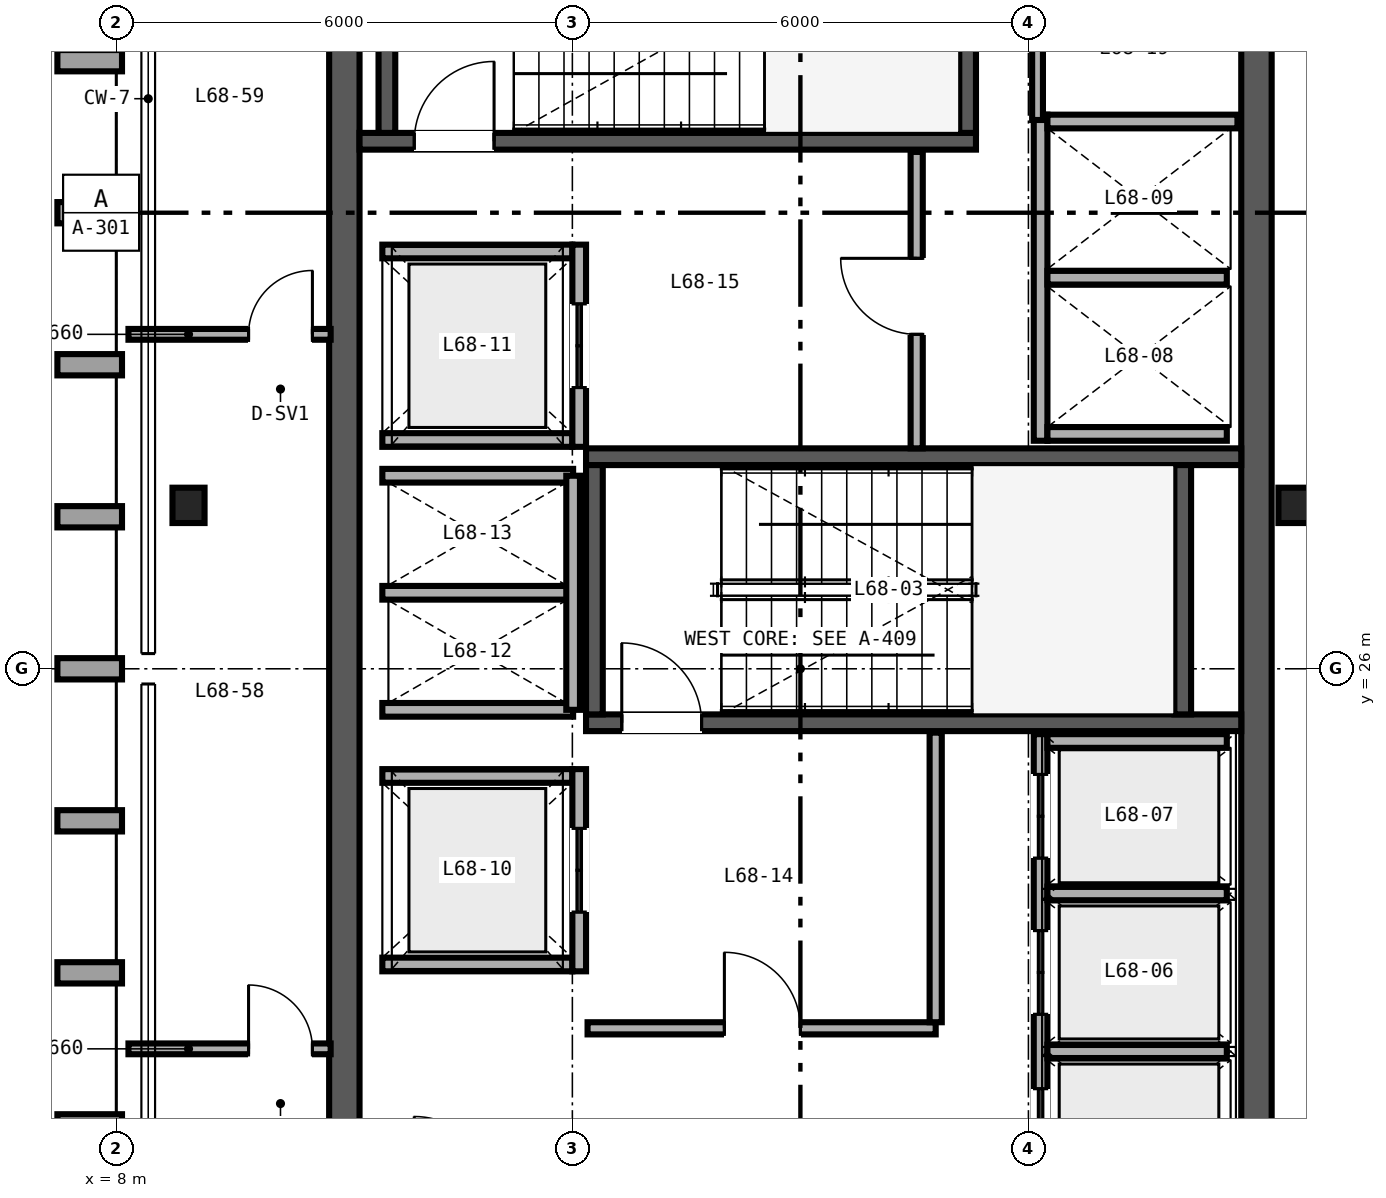
"""IFC4 building model, lengths in metres.
Left out: names, types, materials, properties, quantities, classifications, styles, units other than length and angle.
Written with IfcOpenShell. Run it as: python <this file> out.ifc"""

import sys

from ifc_helpers import new_model, si_unit, direction, frame, frame_2d, origin, origin_2d, place, context, subcontext, project, spatial, rectangle, i_section, extrude, source, transform, mapped, element, fill, save


model = new_model("IFC4")
c1 = context("Model", 3, precision=1e-05, world=origin(), true_north=direction((0.0, 1.0)))
c2 = subcontext(c1, "Body", "Model", "MODEL_VIEW")
j1 = project(units=[si_unit("LENGTHUNIT", "METRE"), si_unit("PLANEANGLEUNIT", "RADIAN")], contexts=[c1])
p1 = place(None, origin())
s1 = spatial("IfcSite", under=j1, at=p1, CompositionType="ELEMENT")
p2 = place(p1, origin())
s2 = spatial("IfcBuilding", under=s1, at=p2, CompositionType="ELEMENT")
p3 = place(p2, frame((0.0, 0.0, 268.8)))
s3 = spatial("IfcBuildingStorey", under=s2, at=p3, CompositionType="ELEMENT", Elevation=268.8)
for number, where, z_axis, x_axis in (
    (1, (11.0, 15.2, 0.0), (0.0, 0.0, 1.0), (0.0, 1.0, 0.0)),
    (2, (23.0, 15.2, 0.0), (0.0, 0.0, 1.0), (0.0, 1.0, 0.0)),
):
    element("IfcWall", number, at=place(p3, frame(where, z_axis=z_axis, x_axis=x_axis)), inside=s3, PredefinedType="SHEAR", context=c2, shape_type="SweptSolid", body=[
        extrude(rectangle(XDim=21.6, YDim=0.4, at=frame_2d((10.8, 0.0))), origin(), (0.0, 0.0, 1.0), 3.28),
    ])
p4 = place(p3, frame((11.2, 32.94, 0.0), z_axis=(0.0, 0.0, 1.0), x_axis=(1.0, 0.0, 0.0)))
e3 = element("IfcWall", 3, at=p4, inside=s3, PredefinedType="SHEAR", context=c2, shape_type="SweptSolid", body=[
    extrude(rectangle(XDim=8.11, YDim=0.22, at=frame_2d((4.055, 0.0))), origin(), (0.0, 0.0, 1.0), 3.4),
])
p5 = place(p4, frame((0.72, 0.0, 0.0)))
e4 = element("IfcOpeningElement", 4, at=p5, cuts=e3, PredefinedType="OPENING", context=c2, shape_type="SweptSolid", body=[
    extrude(rectangle(XDim=1.05, YDim=2.15, at=frame_2d((0.525, 1.075))), frame((0.0, 0.12, 0.0), z_axis=(0.0, -1.0, 0.0), x_axis=(1.0, 0.0, 0.0)), (0.0, 0.0, 1.0), 0.24),
])
for number, where, z_axis, x_axis in (
    (5, (11.56, 33.05, 0.0), (0.0, 0.0, 1.0), (0.0, 1.0, 0.0)),
    (6, (19.2, 33.05, 0.0), (0.0, 0.0, 1.0), (0.0, 1.0, 0.0)),
):
    element("IfcWall", number, at=place(p3, frame(where, z_axis=z_axis, x_axis=x_axis)), inside=s3, PredefinedType="SHEAR", context=c2, shape_type="SweptSolid", body=[
        extrude(rectangle(XDim=3.28, YDim=0.22, at=frame_2d((1.64, 0.0))), origin(), (0.0, 0.0, 1.0), 3.4),
    ])
p6 = place(p3, frame((14.18, 25.29, 0.0), z_axis=(0.0, 0.0, 1.0), x_axis=(1.0, 0.0, 0.0)))
e7 = element("IfcWall", 7, at=p6, inside=s3, PredefinedType="SHEAR", context=c2, shape_type="SweptSolid", body=[
    extrude(rectangle(XDim=8.62, YDim=0.22, at=frame_2d((4.31, 0.0))), origin(), (0.0, 0.0, 1.0), 3.4),
])
p7 = place(p6, frame((0.47, 0.0, 0.0)))
e8 = element("IfcOpeningElement", 8, at=p7, cuts=e7, PredefinedType="OPENING", context=c2, shape_type="SweptSolid", body=[
    extrude(rectangle(XDim=1.05, YDim=2.15, at=frame_2d((0.525, 1.075))), frame((0.0, 0.12, 0.0), z_axis=(0.0, -1.0, 0.0), x_axis=(1.0, 0.0, 0.0)), (0.0, 0.0, 1.0), 0.24),
])
p8 = place(p3, frame((14.18, 28.79, 0.0), z_axis=(0.0, 0.0, 1.0), x_axis=(1.0, 0.0, 0.0)))
e9 = element("IfcWall", 9, at=p8, inside=s3, PredefinedType="SHEAR", context=c2, shape_type="SweptSolid", body=[
    extrude(rectangle(XDim=8.62, YDim=0.22, at=frame_2d((4.31, 0.0))), origin(), (0.0, 0.0, 1.0), 3.4),
])
for number, where, z_axis, x_axis in (
    (10, (14.29, 25.4, 0.0), (0.0, 0.0, 1.0), (0.0, 1.0, 0.0)),
    (11, (22.03, 25.4, 0.0), (0.0, 0.0, 1.0), (0.0, 1.0, 0.0)),
):
    element("IfcWall", number, at=place(p3, frame(where, z_axis=z_axis, x_axis=x_axis)), inside=s3, PredefinedType="SHEAR", context=c2, shape_type="SweptSolid", body=[
        extrude(rectangle(XDim=3.28, YDim=0.22, at=frame_2d((1.64, 0.0))), origin(), (0.0, 0.0, 1.0), 3.4),
    ])
m1 = source(origin(), c2, "Body", "SweptSolid", [
    extrude(i_section(OverallWidth=0.422, OverallDepth=0.465, WebThickness=0.045, FlangeThickness=0.073, FilletRadius=0.025, at=origin_2d()), origin(), (0.0, 0.0, 1.0), 3.28),
])
for number, where, z_axis, x_axis in (
    (12, (8.95, 28.15, 0.0), (0.0, 0.0, 1.0), (1.0, 0.0, 0.0)),
    (13, (23.5, 28.15, 0.0), (0.0, 0.0, 1.0), (1.0, 0.0, 0.0)),
):
    element("IfcColumn", number, at=place(p3, frame(where, z_axis=z_axis, x_axis=x_axis)), inside=s3, PredefinedType="COLUMN", context=c2, shape_type="MappedRepresentation", body=[
        mapped(m1, transform((0.0, 0.0, 0.0), scale=1.0)),
    ])
p9 = place(p3, frame((20.16, 18.82, 0.0), z_axis=(0.0, 0.0, 1.0), x_axis=(0.0, 1.0, 0.0)))
e14 = element("IfcWall", 14, at=p9, inside=s3, PredefinedType="SOLIDWALL", context=c2, shape_type="SweptSolid", body=[
    extrude(rectangle(XDim=6.32, YDim=0.18, at=frame_2d((3.16, 0.0))), origin(), (0.0, 0.0, 1.0), 2.38),
])
p10 = place(p9, frame((0.555, 0.0, 0.0)))
e15 = element("IfcOpeningElement", 15, at=p10, cuts=e14, PredefinedType="OPENING", context=c2, shape_type="SweptSolid", body=[
    extrude(rectangle(XDim=1.1, YDim=2.2, at=frame_2d((0.55, 1.1))), frame((0.0, 0.1, 0.0), z_axis=(0.0, -1.0, 0.0), x_axis=(1.0, 0.0, 0.0)), (0.0, 0.0, 1.0), 0.2),
])
p11 = place(p9, frame((2.635, 0.0, 0.0)))
e16 = element("IfcOpeningElement", 16, at=p11, cuts=e14, PredefinedType="OPENING", context=c2, shape_type="SweptSolid", body=[
    extrude(rectangle(XDim=1.1, YDim=2.2, at=frame_2d((0.55, 1.1))), frame((0.0, 0.1, 0.0), z_axis=(0.0, -1.0, 0.0), x_axis=(1.0, 0.0, 0.0)), (0.0, 0.0, 1.0), 0.2),
])
p12 = place(p9, frame((4.69, 0.0, 0.0)))
e17 = element("IfcOpeningElement", 17, at=p12, cuts=e14, PredefinedType="OPENING", context=c2, shape_type="SweptSolid", body=[
    extrude(rectangle(XDim=1.1, YDim=2.2, at=frame_2d((0.55, 1.1))), frame((0.0, 0.1, 0.0), z_axis=(0.0, -1.0, 0.0), x_axis=(1.0, 0.0, 0.0)), (0.0, 0.0, 1.0), 0.2),
])
p13 = place(p3, frame((20.25, 25.05, 0.0), z_axis=(0.0, 0.0, 1.0), x_axis=(1.0, 0.0, 0.0)))
e18 = element("IfcWall", 18, at=p13, inside=s3, PredefinedType="SOLIDWALL", context=c2, shape_type="SweptSolid", body=[
    extrude(rectangle(XDim=2.36, YDim=0.18, at=frame_2d((1.18, 0.0))), origin(), (0.0, 0.0, 1.0), 3.28),
])
p14 = place(p3, frame((20.25, 20.965, 0.0), z_axis=(0.0, 0.0, 1.0), x_axis=(1.0, 0.0, 0.0)))
e19 = element("IfcWall", 19, at=p14, inside=s3, PredefinedType="SOLIDWALL", context=c2, shape_type="SweptSolid", body=[
    extrude(rectangle(XDim=2.36, YDim=0.18, at=frame_2d((1.18, 0.0))), origin(), (0.0, 0.0, 1.0), 2.38),
])
p15 = place(p3, frame((20.25, 23.045, 0.0), z_axis=(0.0, 0.0, 1.0), x_axis=(1.0, 0.0, 0.0)))
e20 = element("IfcWall", 20, at=p15, inside=s3, PredefinedType="SOLIDWALL", context=c2, shape_type="SweptSolid", body=[
    extrude(rectangle(XDim=2.36, YDim=0.18, at=frame_2d((1.18, 0.0))), origin(), (0.0, 0.0, 1.0), 3.28),
])
p16 = place(p3, frame((20.16, 29.0, 0.0), z_axis=(0.0, 0.0, 1.0), x_axis=(0.0, 1.0, 0.0)))
e21 = element("IfcWall", 21, at=p16, inside=s3, PredefinedType="SOLIDWALL", context=c2, shape_type="SweptSolid", body=[
    extrude(rectangle(XDim=4.29, YDim=0.18, at=frame_2d((2.145, 0.0))), origin(), (0.0, 0.0, 1.0), 3.28),
])
p17 = place(p3, frame((20.25, 29.09, 0.0), z_axis=(0.0, 0.0, 1.0), x_axis=(1.0, 0.0, 0.0)))
e22 = element("IfcWall", 22, at=p17, inside=s3, PredefinedType="SOLIDWALL", context=c2, shape_type="SweptSolid", body=[
    extrude(rectangle(XDim=2.36, YDim=0.18, at=frame_2d((1.18, 0.0))), origin(), (0.0, 0.0, 1.0), 3.28),
])
p18 = place(p3, frame((20.25, 33.2, 0.0), z_axis=(0.0, 0.0, 1.0), x_axis=(1.0, 0.0, 0.0)))
e23 = element("IfcWall", 23, at=p18, inside=s3, PredefinedType="SOLIDWALL", context=c2, shape_type="SweptSolid", body=[
    extrude(rectangle(XDim=2.5, YDim=0.18, at=frame_2d((1.25, 0.0))), origin(), (0.0, 0.0, 1.0), 3.28),
])
p19 = place(p3, frame((20.25, 31.145, 0.0), z_axis=(0.0, 0.0, 1.0), x_axis=(1.0, 0.0, 0.0)))
e24 = element("IfcWall", 24, at=p19, inside=s3, PredefinedType="SOLIDWALL", context=c2, shape_type="SweptSolid", body=[
    extrude(rectangle(XDim=2.36, YDim=0.18, at=frame_2d((1.18, 0.0))), origin(), (0.0, 0.0, 1.0), 3.28),
])
for number, where, z_axis, x_axis in (
    (25, (11.5, 22.11, 0.0), (0.0, 0.0, 1.0), (1.0, 0.0, 0.0)),
    (26, (11.5, 24.59, 0.0), (0.0, 0.0, 1.0), (1.0, 0.0, 0.0)),
):
    element("IfcWall", number, at=place(p3, frame(where, z_axis=z_axis, x_axis=x_axis)), inside=s3, PredefinedType="SOLIDWALL", context=c2, shape_type="SweptSolid", body=[
        extrude(rectangle(XDim=2.5, YDim=0.18, at=frame_2d((1.25, 0.0))), origin(), (0.0, 0.0, 1.0), 3.28),
    ])
p20 = place(p3, frame((14.09, 22.02, 0.0), z_axis=(0.0, 0.0, 1.0), x_axis=(0.0, 1.0, 0.0)))
e27 = element("IfcWall", 27, at=p20, inside=s3, PredefinedType="SOLIDWALL", context=c2, shape_type="SweptSolid", body=[
    extrude(rectangle(XDim=2.66, YDim=0.18, at=frame_2d((1.33, 0.0))), origin(), (0.0, 0.0, 1.0), 3.28),
])
p21 = place(p20, frame((0.78, 0.0, 0.0)))
e28 = element("IfcOpeningElement", 28, at=p21, cuts=e27, PredefinedType="OPENING", context=c2, shape_type="SweptSolid", body=[
    extrude(rectangle(XDim=1.1, YDim=2.2, at=frame_2d((0.55, 1.1))), frame((0.0, 0.1, 0.0), z_axis=(0.0, -1.0, 0.0), x_axis=(1.0, 0.0, 0.0)), (0.0, 0.0, 1.0), 0.2),
])
for number, where, z_axis, x_axis in (
    (29, (11.5, 29.01, 0.0), (0.0, 0.0, 1.0), (1.0, 0.0, 0.0)),
    (30, (11.5, 31.49, 0.0), (0.0, 0.0, 1.0), (1.0, 0.0, 0.0)),
):
    element("IfcWall", number, at=place(p3, frame(where, z_axis=z_axis, x_axis=x_axis)), inside=s3, PredefinedType="SOLIDWALL", context=c2, shape_type="SweptSolid", body=[
        extrude(rectangle(XDim=2.5, YDim=0.18, at=frame_2d((1.25, 0.0))), origin(), (0.0, 0.0, 1.0), 3.28),
    ])
p22 = place(p3, frame((14.09, 28.92, 0.0), z_axis=(0.0, 0.0, 1.0), x_axis=(0.0, 1.0, 0.0)))
e31 = element("IfcWall", 31, at=p22, inside=s3, PredefinedType="SOLIDWALL", context=c2, shape_type="SweptSolid", body=[
    extrude(rectangle(XDim=2.66, YDim=0.18, at=frame_2d((1.33, 0.0))), origin(), (0.0, 0.0, 1.0), 3.28),
])
p23 = place(p22, frame((0.78, 0.0, 0.0)))
e32 = element("IfcOpeningElement", 32, at=p23, cuts=e31, PredefinedType="OPENING", context=c2, shape_type="SweptSolid", body=[
    extrude(rectangle(XDim=1.1, YDim=2.2, at=frame_2d((0.55, 1.1))), frame((0.0, 0.1, 0.0), z_axis=(0.0, -1.0, 0.0), x_axis=(1.0, 0.0, 0.0)), (0.0, 0.0, 1.0), 0.2),
])
for number, where, z_axis, x_axis in (
    (33, (11.5, 25.46, 0.0), (0.0, 0.0, 1.0), (1.0, 0.0, 0.0)),
    (34, (11.5, 27.0, 0.0), (0.0, 0.0, 1.0), (1.0, 0.0, 0.0)),
    (35, (11.5, 28.54, 0.0), (0.0, 0.0, 1.0), (1.0, 0.0, 0.0)),
):
    element("IfcWall", number, at=place(p3, frame(where, z_axis=z_axis, x_axis=x_axis)), inside=s3, PredefinedType="SOLIDWALL", context=c2, shape_type="SweptSolid", body=[
        extrude(rectangle(XDim=2.51, YDim=0.18, at=frame_2d((1.255, 0.0))), origin(), (0.0, 0.0, 1.0), 3.28),
    ])
p24 = place(p3, frame((14.01, 25.46, 0.0), z_axis=(0.0, 0.0, 1.0), x_axis=(0.0, 1.0, 0.0)))
e36 = element("IfcWall", 36, at=p24, inside=s3, PredefinedType="SOLIDWALL", context=c2, shape_type="SweptSolid", body=[
    extrude(rectangle(XDim=3.08, YDim=0.18, at=frame_2d((1.54, 0.0))), origin(), (0.0, 0.0, 1.0), 3.28),
])
p25 = place(p3, frame((14.2, 21.27, 0.0), z_axis=(0.0, 0.0, 1.0), x_axis=(1.0, 0.0, 0.0)))
e37 = element("IfcWall", 37, at=p25, inside=s3, PredefinedType="PARTITIONING", context=c2, shape_type="SweptSolid", body=[
    extrude(rectangle(XDim=4.58, YDim=0.16, at=frame_2d((2.29, 0.0))), origin(), (0.0, 0.0, 1.0), 3.28),
])
p26 = place(p25, frame((1.8, 0.0, 0.0)))
e38 = element("IfcOpeningElement", 38, at=p26, cuts=e37, PredefinedType="OPENING", context=c2, shape_type="SweptSolid", body=[
    extrude(rectangle(XDim=1.0, YDim=2.15, at=frame_2d((0.5, 1.075))), frame((0.0, 0.09, 0.0), z_axis=(0.0, -1.0, 0.0), x_axis=(1.0, 0.0, 0.0)), (0.0, 0.0, 1.0), 0.18),
])
p27 = place(p3, frame((18.78, 21.35, 0.0), z_axis=(0.0, 0.0, 1.0), x_axis=(0.0, 1.0, 0.0)))
e39 = element("IfcWall", 39, at=p27, inside=s3, PredefinedType="PARTITIONING", context=c2, shape_type="SweptSolid", body=[
    extrude(rectangle(XDim=3.81, YDim=0.16, at=frame_2d((1.905, 0.0))), origin(), (0.0, 0.0, 1.0), 3.28),
])
p28 = place(p3, frame((18.53, 28.9, 0.0), z_axis=(0.0, 0.0, 1.0), x_axis=(0.0, 1.0, 0.0)))
e40 = element("IfcWall", 40, at=p28, inside=s3, PredefinedType="PARTITIONING", context=c2, shape_type="SweptSolid", body=[
    extrude(rectangle(XDim=3.9, YDim=0.16, at=frame_2d((1.95, 0.0))), origin(), (0.0, 0.0, 1.0), 3.28),
])
p29 = place(p28, frame((1.5, 0.0, 0.0)))
e41 = element("IfcOpeningElement", 41, at=p29, cuts=e40, PredefinedType="OPENING", context=c2, shape_type="SweptSolid", body=[
    extrude(rectangle(XDim=1.0, YDim=2.15, at=frame_2d((0.5, 1.075))), frame((0.0, 0.09, 0.0), z_axis=(0.0, -1.0, 0.0), x_axis=(1.0, 0.0, 0.0)), (0.0, 0.0, 1.0), 0.18),
])
p30 = place(p3, frame((20.12, 33.22, 0.0), z_axis=(0.0, 0.0, 1.0), x_axis=(0.0, 1.0, 0.0)))
e42 = element("IfcWall", 42, at=p30, inside=s3, PredefinedType="PARTITIONING", context=c2, shape_type="SweptSolid", body=[
    extrude(rectangle(XDim=1.86, YDim=0.142, at=frame_2d((0.93, 0.0))), origin(), (0.0, 0.0, 1.0), 3.28),
])
p31 = place(p3, frame((8.16, 21.0, 0.0), z_axis=(0.0, 0.0, 1.0), x_axis=(1.0, 0.0, 0.0)))
e43 = element("IfcWall", 43, at=p31, inside=s3, PredefinedType="PARTITIONING", context=c2, shape_type="SweptSolid", body=[
    extrude(rectangle(XDim=2.66, YDim=0.142, at=frame_2d((1.33, 0.0))), origin(), (0.0, 0.0, 1.0), 2.38),
])
p32 = place(p31, frame((1.58, 0.0, 0.0)))
e44 = element("IfcOpeningElement", 44, at=p32, cuts=e43, PredefinedType="OPENING", context=c2, shape_type="SweptSolid", body=[
    extrude(rectangle(XDim=0.84, YDim=2.1, at=frame_2d((0.42, 1.05))), frame((0.0, 0.081, 0.0), z_axis=(0.0, -1.0, 0.0), x_axis=(1.0, 0.0, 0.0)), (0.0, 0.0, 1.0), 0.162),
])
p33 = place(p3, frame((8.16, 30.4, 0.0), z_axis=(0.0, 0.0, 1.0), x_axis=(1.0, 0.0, 0.0)))
e45 = element("IfcWall", 45, at=p33, inside=s3, PredefinedType="PARTITIONING", context=c2, shape_type="SweptSolid", body=[
    extrude(rectangle(XDim=2.66, YDim=0.142, at=frame_2d((1.33, 0.0))), origin(), (0.0, 0.0, 1.0), 2.663),
])
p34 = place(p33, frame((1.58, 0.0, 0.0)))
e46 = element("IfcOpeningElement", 46, at=p34, cuts=e45, PredefinedType="OPENING", context=c2, shape_type="SweptSolid", body=[
    extrude(rectangle(XDim=0.84, YDim=2.1, at=frame_2d((0.42, 1.05))), frame((0.0, 0.081, 0.0), z_axis=(0.0, -1.0, 0.0), x_axis=(1.0, 0.0, 0.0)), (0.0, 0.0, 1.0), 0.162),
])
m2 = source(origin(), c2, "Body", "SweptSolid", [
    extrude(rectangle(XDim=1.05, YDim=2.15, at=frame_2d((0.525, 1.075))), frame((0.0, 0.025, 0.0), z_axis=(0.0, -1.0, 0.0), x_axis=(1.0, 0.0, 0.0)), (0.0, 0.0, 1.0), 0.05),
])
p35 = place(p5, origin())
e47 = element("IfcDoor", 47, at=p35, inside=s3, OperationType="SINGLE_SWING_RIGHT", PredefinedType="DOOR", context=c2, shape_type="MappedRepresentation", body=[
    mapped(m2, transform((0.0, 0.0, 0.0), scale=1.0)),
])
fill(e4, e47)
p36 = place(p7, origin())
e48 = element("IfcDoor", 48, at=p36, inside=s3, OperationType="SINGLE_SWING_LEFT", PredefinedType="DOOR", context=c2, shape_type="MappedRepresentation", body=[
    mapped(m2, transform((0.0, 0.0, 0.0), scale=1.0)),
])
fill(e8, e48)
m3 = source(origin(), c2, "Body", "SweptSolid", [
    extrude(rectangle(XDim=1.1, YDim=2.2, at=frame_2d((0.55, 1.1))), frame((0.0, 0.025, 0.0), z_axis=(0.0, -1.0, 0.0), x_axis=(1.0, 0.0, 0.0)), (0.0, 0.0, 1.0), 0.05),
])
p37 = place(p10, origin())
e49 = element("IfcDoor", 49, at=p37, inside=s3, OperationType="DOUBLE_DOOR_SLIDING", PredefinedType="DOOR", context=c2, shape_type="MappedRepresentation", body=[
    mapped(m3, transform((0.0, 0.0, 0.0), scale=1.0)),
])
fill(e15, e49)
p38 = place(p11, origin())
e50 = element("IfcDoor", 50, at=p38, inside=s3, OperationType="DOUBLE_DOOR_SLIDING", PredefinedType="DOOR", context=c2, shape_type="MappedRepresentation", body=[
    mapped(m3, transform((0.0, 0.0, 0.0), scale=1.0)),
])
fill(e16, e50)
p39 = place(p12, origin())
e51 = element("IfcDoor", 51, at=p39, inside=s3, OperationType="DOUBLE_DOOR_SLIDING", PredefinedType="DOOR", context=c2, shape_type="MappedRepresentation", body=[
    mapped(m3, transform((0.0, 0.0, 0.0), scale=1.0)),
])
fill(e17, e51)
p40 = place(p21, origin())
e52 = element("IfcDoor", 52, at=p40, inside=s3, OperationType="DOUBLE_DOOR_SLIDING", PredefinedType="DOOR", context=c2, shape_type="MappedRepresentation", body=[
    mapped(m3, transform((0.0, 0.0, 0.0), scale=1.0)),
])
fill(e28, e52)
p41 = place(p23, origin())
e53 = element("IfcDoor", 53, at=p41, inside=s3, OperationType="DOUBLE_DOOR_SLIDING", PredefinedType="DOOR", context=c2, shape_type="MappedRepresentation", body=[
    mapped(m3, transform((0.0, 0.0, 0.0), scale=1.0)),
])
fill(e32, e53)
m4 = source(origin(), c2, "Body", "SweptSolid", [
    extrude(rectangle(XDim=1.0, YDim=2.15, at=frame_2d((0.5, 1.075))), frame((0.0, 0.025, 0.0), z_axis=(0.0, -1.0, 0.0), x_axis=(1.0, 0.0, 0.0)), (0.0, 0.0, 1.0), 0.05),
])
p42 = place(p26, origin())
e54 = element("IfcDoor", 54, at=p42, inside=s3, OperationType="SINGLE_SWING_LEFT", PredefinedType="DOOR", context=c2, shape_type="MappedRepresentation", body=[
    mapped(m4, transform((0.0, 0.0, 0.0), scale=1.0)),
])
fill(e38, e54)
p43 = place(p29, origin())
e55 = element("IfcDoor", 55, at=p43, inside=s3, OperationType="SINGLE_SWING_RIGHT", PredefinedType="DOOR", context=c2, shape_type="MappedRepresentation", body=[
    mapped(m4, transform((0.0, 0.0, 0.0), scale=1.0)),
])
fill(e41, e55)
m5 = source(origin(), c2, "Body", "SweptSolid", [
    extrude(rectangle(XDim=0.84, YDim=2.1, at=frame_2d((0.42, 1.05))), frame((0.0, 0.025, 0.0), z_axis=(0.0, -1.0, 0.0), x_axis=(1.0, 0.0, 0.0)), (0.0, 0.0, 1.0), 0.05),
])
p44 = place(p32, origin())
e56 = element("IfcDoor", 56, at=p44, inside=s3, OperationType="SINGLE_SWING_LEFT", PredefinedType="DOOR", context=c2, shape_type="MappedRepresentation", body=[
    mapped(m5, transform((0.0, 0.0, 0.0), scale=1.0)),
])
fill(e44, e56)
p45 = place(p34, origin())
e57 = element("IfcDoor", 57, at=p45, inside=s3, OperationType="SINGLE_SWING_RIGHT", PredefinedType="DOOR", context=c2, shape_type="MappedRepresentation", body=[
    mapped(m5, transform((0.0, 0.0, 0.0), scale=1.0)),
])
fill(e46, e57)
save(model, sys.argv[1])
